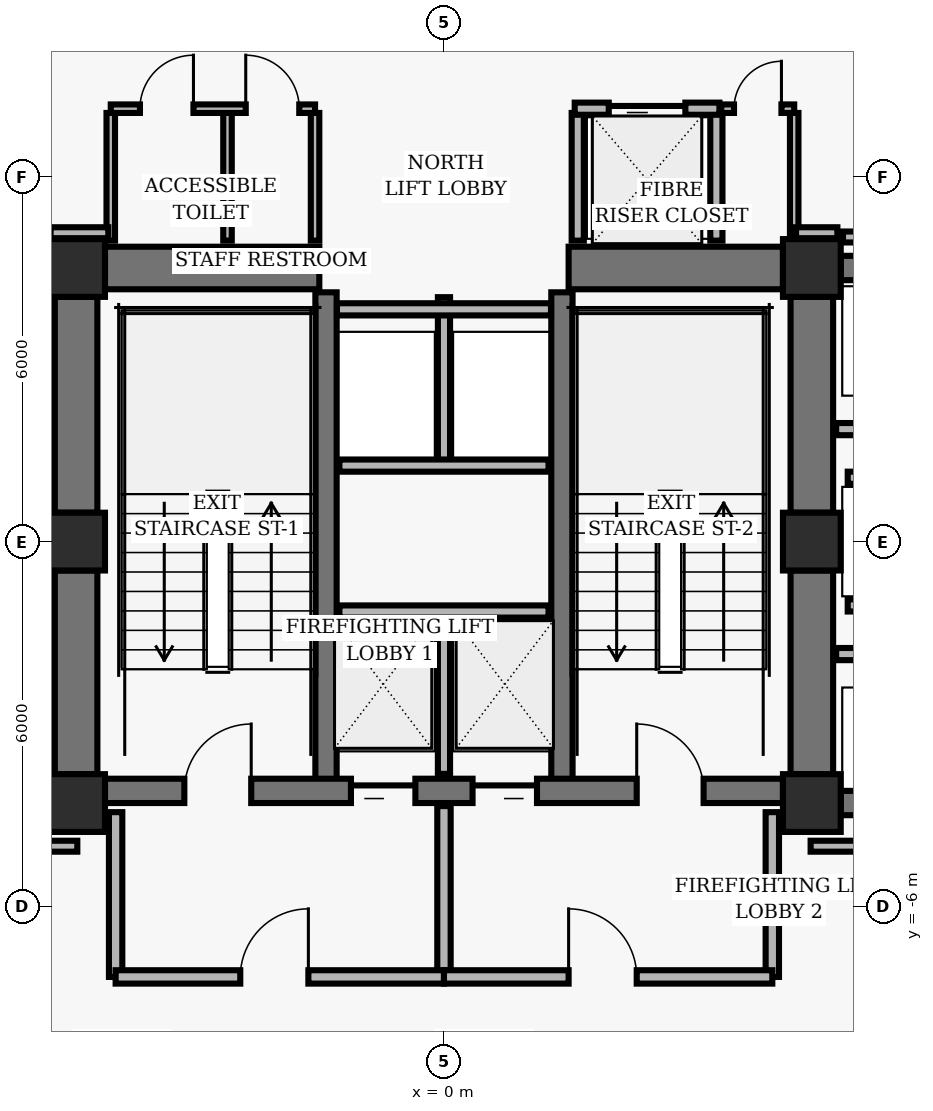
"""IFC4 building model, lengths in metres.
Left out: names, types, materials, properties, quantities, classifications, styles, units other than length and angle.
Written with IfcOpenShell. Run it as: python <this file> out.ifc"""

import sys

from ifc_helpers import new_model, si_unit, direction, frame, frame_2d, origin, origin_2d, place, context, subcontext, project, spatial, rectangle, hollow_rectangle, extrude, element, fill, save


model = new_model("IFC4")
c1 = context("Model", 3, precision=1e-05, world=origin(), true_north=direction((0.0, 1.0)))
c2 = subcontext(c1, "Body", "Model", "MODEL_VIEW")
j1 = project(units=[si_unit("LENGTHUNIT", "METRE"), si_unit("PLANEANGLEUNIT", "RADIAN")], contexts=[c1])
p1 = place(None, origin())
s1 = spatial("IfcSite", under=j1, at=p1, CompositionType="ELEMENT")
p2 = place(p1, origin())
s2 = spatial("IfcBuilding", under=s1, at=p2, CompositionType="ELEMENT")
p3 = place(p2, frame((0.0, 0.0, 35.68)))
s3 = spatial("IfcBuildingStorey", under=s2, at=p3, CompositionType="ELEMENT", Elevation=35.68)
for number, where, z_axis, x_axis in (
    (1, (-6.05, 4.5, 0.0), (0.0, 0.0, 1.0), (1.0, 0.0, 0.0)),
    (2, (6.05, 4.5, 0.0), (0.0, 0.0, 1.0), (1.0, 0.0, 0.0)),
    (3, (-6.05, 0.0, 0.0), (0.0, 0.0, 1.0), (1.0, 0.0, 0.0)),
    (4, (6.05, 0.0, 0.0), (0.0, 0.0, 1.0), (1.0, 0.0, 0.0)),
    (5, (-6.05, -4.3, 0.0), (0.0, 0.0, 1.0), (1.0, 0.0, 0.0)),
    (6, (6.05, -4.3, 0.0), (0.0, 0.0, 1.0), (1.0, 0.0, 0.0)),
):
    element("IfcColumn", number, at=place(p3, frame(where, z_axis=z_axis, x_axis=x_axis)), inside=s3, PredefinedType="COLUMN", context=c2, shape_type="SweptSolid", body=[
        extrude(hollow_rectangle(XDim=0.95, YDim=0.95, WallThickness=0.06, InnerFilletRadius=0.02, OuterFilletRadius=0.04, at=origin_2d()), origin(), (0.0, 0.0, 1.0), 3.36),
    ])
p4 = place(p3, frame((-6.05, 0.475, 0.0), z_axis=(0.0, 0.0, 1.0), x_axis=(0.0, 1.0, 0.0)))
e7 = element("IfcWall", 7, at=p4, inside=s3, PredefinedType="SHEAR", context=c2, shape_type="SweptSolid", body=[
    extrude(rectangle(XDim=3.55, YDim=0.7, at=frame_2d((1.775, 0.0))), origin(), (0.0, 0.0, 1.0), 3.098),
])
p5 = place(p3, frame((-6.05, -3.825, 0.0), z_axis=(0.0, 0.0, 1.0), x_axis=(0.0, 1.0, 0.0)))
e8 = element("IfcWall", 8, at=p5, inside=s3, PredefinedType="SHEAR", context=c2, shape_type="SweptSolid", body=[
    extrude(rectangle(XDim=3.35, YDim=0.7, at=frame_2d((1.675, 0.0))), origin(), (0.0, 0.0, 1.0), 3.098),
])
p6 = place(p3, frame((6.05, 0.475, 0.0), z_axis=(0.0, 0.0, 1.0), x_axis=(0.0, 1.0, 0.0)))
e9 = element("IfcWall", 9, at=p6, inside=s3, PredefinedType="SHEAR", context=c2, shape_type="SweptSolid", body=[
    extrude(rectangle(XDim=3.55, YDim=0.7, at=frame_2d((1.775, 0.0))), origin(), (0.0, 0.0, 1.0), 3.098),
])
p7 = place(p3, frame((6.05, -3.825, 0.0), z_axis=(0.0, 0.0, 1.0), x_axis=(0.0, 1.0, 0.0)))
e10 = element("IfcWall", 10, at=p7, inside=s3, PredefinedType="SHEAR", context=c2, shape_type="SweptSolid", body=[
    extrude(rectangle(XDim=3.35, YDim=0.7, at=frame_2d((1.675, 0.0))), origin(), (0.0, 0.0, 1.0), 3.098),
])
for number, where, z_axis, x_axis in (
    (11, (-1.94, -4.1, 0.0), (0.0, 0.0, 1.0), (0.0, 1.0, 0.0)),
    (12, (1.94, -4.1, 0.0), (0.0, 0.0, 1.0), (0.0, 1.0, 0.0)),
):
    element("IfcWall", number, at=place(p3, frame(where, z_axis=z_axis, x_axis=x_axis)), inside=s3, PredefinedType="SHEAR", context=c2, shape_type="SweptSolid", body=[
        extrude(rectangle(XDim=8.2, YDim=0.35, at=frame_2d((4.1, 0.0))), origin(), (0.0, 0.0, 1.0), 3.098),
    ])
p8 = place(p3, frame((-5.575, -4.1, 0.0), z_axis=(0.0, 0.0, 1.0), x_axis=(1.0, 0.0, 0.0)))
e13 = element("IfcWall", 13, at=p8, inside=s3, PredefinedType="SHEAR", context=c2, shape_type="SweptSolid", body=[
    extrude(rectangle(XDim=11.15, YDim=0.4, at=frame_2d((5.575, 0.0))), origin(), (0.0, 0.0, 1.0), 3.098),
])
p9 = place(p8, frame((1.305, 0.0, 0.0)))
e14 = element("IfcOpeningElement", 14, at=p9, cuts=e13, PredefinedType="OPENING", context=c2, shape_type="SweptSolid", body=[
    extrude(rectangle(XDim=1.1, YDim=2.04, at=frame_2d((0.55, 1.02))), frame((0.0, 0.21, 0.0), z_axis=(0.0, -1.0, 0.0), x_axis=(1.0, 0.0, 0.0)), (0.0, 0.0, 1.0), 0.42),
])
p10 = place(p8, frame((8.745, 0.0, 0.0)))
e15 = element("IfcOpeningElement", 15, at=p10, cuts=e13, PredefinedType="OPENING", context=c2, shape_type="SweptSolid", body=[
    extrude(rectangle(XDim=1.1, YDim=2.04, at=frame_2d((0.55, 1.02))), frame((0.0, 0.21, 0.0), z_axis=(0.0, -1.0, 0.0), x_axis=(1.0, 0.0, 0.0)), (0.0, 0.0, 1.0), 0.42),
])
p11 = place(p8, frame((4.045, 0.0, 0.0)))
e16 = element("IfcOpeningElement", 16, at=p11, cuts=e13, PredefinedType="OPENING", context=c2, shape_type="SweptSolid", body=[
    extrude(rectangle(XDim=1.06, YDim=2.04, at=frame_2d((0.53, 1.02))), frame((0.0, 0.21, 0.0), z_axis=(0.0, -1.0, 0.0), x_axis=(1.0, 0.0, 0.0)), (0.0, 0.0, 1.0), 0.42),
])
p12 = place(p8, frame((6.045, 0.0, 0.0)))
e17 = element("IfcOpeningElement", 17, at=p12, cuts=e13, PredefinedType="OPENING", context=c2, shape_type="SweptSolid", body=[
    extrude(rectangle(XDim=1.06, YDim=2.04, at=frame_2d((0.53, 1.02))), frame((0.0, 0.21, 0.0), z_axis=(0.0, -1.0, 0.0), x_axis=(1.0, 0.0, 0.0)), (0.0, 0.0, 1.0), 0.42),
])
for number, where, z_axis, x_axis in (
    (18, (-5.575, 4.5, 0.0), (0.0, 0.0, 1.0), (1.0, 0.0, 0.0)),
    (19, (2.05, 4.5, 0.0), (0.0, 0.0, 1.0), (1.0, 0.0, 0.0)),
):
    element("IfcWall", number, at=place(p3, frame(where, z_axis=z_axis, x_axis=x_axis)), inside=s3, PredefinedType="SHEAR", context=c2, shape_type="SweptSolid", body=[
        extrude(rectangle(XDim=3.525, YDim=0.7, at=frame_2d((1.762, 0.0))), origin(), (0.0, 0.0, 1.0), 3.098),
    ])
for number, where, z_axis, x_axis in (
    (20, (6.525, 4.5, 0.0), (0.0, 0.0, 1.0), (1.0, 0.0, 0.0)),
    (21, (6.525, -4.3, 0.0), (0.0, 0.0, 1.0), (1.0, 0.0, 0.0)),
):
    element("IfcWall", number, at=place(p3, frame(where, z_axis=z_axis, x_axis=x_axis)), inside=s3, PredefinedType="SHEAR", context=c2, shape_type="SweptSolid", body=[
        extrude(rectangle(XDim=1.95, YDim=0.4, at=frame_2d((0.975, 0.0))), origin(), (0.0, 0.0, 1.0), 3.098),
    ])
p13 = place(p3, frame((0.0, -3.82, 0.0), z_axis=(0.0, 0.0, 1.0), x_axis=(0.0, 1.0, 0.0)))
e22 = element("IfcWall", 22, at=p13, inside=s3, PredefinedType="PARTITIONING", context=c2, shape_type="SweptSolid", body=[
    extrude(rectangle(XDim=2.67, YDim=0.2, at=frame_2d((1.335, 0.0))), origin(), (0.0, 0.0, 1.0), 3.073),
])
p14 = place(p3, frame((-1.72, -1.15, 0.0), z_axis=(0.0, 0.0, 1.0), x_axis=(1.0, 0.0, 0.0)))
e23 = element("IfcWall", 23, at=p14, inside=s3, PredefinedType="PARTITIONING", context=c2, shape_type="SweptSolid", body=[
    extrude(rectangle(XDim=3.44, YDim=0.2, at=frame_2d((1.72, 0.0))), origin(), (0.0, 0.0, 1.0), 3.073),
])
for number, where, z_axis, x_axis in (
    (24, (-5.4, -7.16, 0.0), (0.0, 0.0, 1.0), (0.0, 1.0, 0.0)),
    (25, (5.4, -7.16, 0.0), (0.0, 0.0, 1.0), (0.0, 1.0, 0.0)),
):
    element("IfcWall", number, at=place(p3, frame(where, z_axis=z_axis, x_axis=x_axis)), inside=s3, PredefinedType="PARTITIONING", context=c2, shape_type="SweptSolid", body=[
        extrude(rectangle(XDim=2.71, YDim=0.22, at=frame_2d((1.355, 0.0))), origin(), (0.0, 0.0, 1.0), 3.073),
    ])
p15 = place(p3, frame((0.0, -7.16, 0.0), z_axis=(0.0, 0.0, 1.0), x_axis=(0.0, 1.0, 0.0)))
e26 = element("IfcWall", 26, at=p15, inside=s3, PredefinedType="PARTITIONING", context=c2, shape_type="SweptSolid", body=[
    extrude(rectangle(XDim=2.81, YDim=0.22, at=frame_2d((1.405, 0.0))), origin(), (0.0, 0.0, 1.0), 3.073),
])
p16 = place(p3, frame((-5.4, -7.16, 0.0), z_axis=(0.0, 0.0, 1.0), x_axis=(1.0, 0.0, 0.0)))
e27 = element("IfcWall", 27, at=p16, inside=s3, PredefinedType="PARTITIONING", context=c2, shape_type="SweptSolid", body=[
    extrude(rectangle(XDim=5.4, YDim=0.22, at=frame_2d((2.7, 0.0))), origin(), (0.0, 0.0, 1.0), 3.073),
])
p17 = place(p16, frame((2.05, 0.0, 0.0)))
e28 = element("IfcOpeningElement", 28, at=p17, cuts=e27, PredefinedType="OPENING", context=c2, shape_type="SweptSolid", body=[
    extrude(rectangle(XDim=1.12, YDim=2.02, at=frame_2d((0.56, 1.01))), frame((0.0, 0.12, 0.0), z_axis=(0.0, -1.0, 0.0), x_axis=(1.0, 0.0, 0.0)), (0.0, 0.0, 1.0), 0.24),
])
p18 = place(p3, frame((0.0, -7.16, 0.0), z_axis=(0.0, 0.0, 1.0), x_axis=(1.0, 0.0, 0.0)))
e29 = element("IfcWall", 29, at=p18, inside=s3, PredefinedType="PARTITIONING", context=c2, shape_type="SweptSolid", body=[
    extrude(rectangle(XDim=5.4, YDim=0.22, at=frame_2d((2.7, 0.0))), origin(), (0.0, 0.0, 1.0), 3.073),
])
p19 = place(p18, frame((2.05, 0.0, 0.0)))
e30 = element("IfcOpeningElement", 30, at=p19, cuts=e29, PredefinedType="OPENING", context=c2, shape_type="SweptSolid", body=[
    extrude(rectangle(XDim=1.12, YDim=2.02, at=frame_2d((0.56, 1.01))), frame((0.0, 0.12, 0.0), z_axis=(0.0, -1.0, 0.0), x_axis=(1.0, 0.0, 0.0)), (0.0, 0.0, 1.0), 0.24),
])
p20 = place(p3, frame((0.0, 1.25, 0.0), z_axis=(0.0, 0.0, 1.0), x_axis=(0.0, 1.0, 0.0)))
e31 = element("IfcWall", 31, at=p20, inside=s3, PredefinedType="PARTITIONING", context=c2, shape_type="SweptSolid", body=[
    extrude(rectangle(XDim=2.77, YDim=0.2, at=frame_2d((1.385, 0.0))), origin(), (0.0, 0.0, 1.0), 3.073),
])
p21 = place(p3, frame((-1.72, 1.25, 0.0), z_axis=(0.0, 0.0, 1.0), x_axis=(1.0, 0.0, 0.0)))
e32 = element("IfcWall", 32, at=p21, inside=s3, PredefinedType="PARTITIONING", context=c2, shape_type="SweptSolid", body=[
    extrude(rectangle(XDim=3.44, YDim=0.2, at=frame_2d((1.72, 0.0))), origin(), (0.0, 0.0, 1.0), 3.073),
])
p22 = place(p3, frame((-1.76, 3.82, 0.0), z_axis=(0.0, 0.0, 1.0), x_axis=(1.0, 0.0, 0.0)))
e33 = element("IfcWall", 33, at=p22, inside=s3, PredefinedType="PARTITIONING", context=c2, shape_type="SweptSolid", body=[
    extrude(rectangle(XDim=3.52, YDim=0.2, at=frame_2d((1.76, 0.0))), origin(), (0.0, 0.0, 1.0), 3.073),
])
for number, where, z_axis, x_axis in (
    (34, (2.2, 4.95, 0.0), (0.0, 0.0, 1.0), (0.0, 1.0, 0.0)),
    (35, (4.48, 4.95, 0.0), (0.0, 0.0, 1.0), (0.0, 1.0, 0.0)),
):
    element("IfcWall", number, at=place(p3, frame(where, z_axis=z_axis, x_axis=x_axis)), inside=s3, PredefinedType="PARTITIONING", context=c2, shape_type="SweptSolid", body=[
        extrude(rectangle(XDim=2.1, YDim=0.2, at=frame_2d((1.05, 0.0))), origin(), (0.0, 0.0, 1.0), 3.073),
    ])
p23 = place(p3, frame((2.15, 7.12, 0.0), z_axis=(0.0, 0.0, 1.0), x_axis=(1.0, 0.0, 0.0)))
e36 = element("IfcWall", 36, at=p23, inside=s3, PredefinedType="PARTITIONING", context=c2, shape_type="SweptSolid", body=[
    extrude(rectangle(XDim=2.38, YDim=0.2, at=frame_2d((1.19, 0.0))), origin(), (0.0, 0.0, 1.0), 3.073),
])
p24 = place(p23, frame((0.56, 0.0, 0.0)))
e37 = element("IfcOpeningElement", 37, at=p24, cuts=e36, PredefinedType="OPENING", context=c2, shape_type="SweptSolid", body=[
    extrude(rectangle(XDim=1.26, YDim=2.06, at=frame_2d((0.63, 1.03))), frame((0.0, 0.11, 0.0), z_axis=(0.0, -1.0, 0.0), x_axis=(1.0, 0.0, 0.0)), (0.0, 0.0, 1.0), 0.22),
])
for number, where, z_axis, x_axis in (
    (38, (-5.48, 4.95, 0.0), (0.0, 0.0, 1.0), (0.0, 1.0, 0.0)),
    (39, (-3.56, 4.95, 0.0), (0.0, 0.0, 1.0), (0.0, 1.0, 0.0)),
    (40, (-2.12, 4.95, 0.0), (0.0, 0.0, 1.0), (0.0, 1.0, 0.0)),
):
    element("IfcWall", number, at=place(p3, frame(where, z_axis=z_axis, x_axis=x_axis)), inside=s3, PredefinedType="PARTITIONING", context=c2, shape_type="SweptSolid", body=[
        extrude(rectangle(XDim=2.1, YDim=0.14, at=frame_2d((1.05, 0.0))), origin(), (0.0, 0.0, 1.0), 3.073),
    ])
p25 = place(p3, frame((-5.48, 7.12, 0.0), z_axis=(0.0, 0.0, 1.0), x_axis=(1.0, 0.0, 0.0)))
e41 = element("IfcWall", 41, at=p25, inside=s3, PredefinedType="PARTITIONING", context=c2, shape_type="SweptSolid", body=[
    extrude(rectangle(XDim=3.36, YDim=0.14, at=frame_2d((1.68, 0.0))), origin(), (0.0, 0.0, 1.0), 3.073),
])
p26 = place(p25, frame((0.48, 0.0, 0.0)))
e42 = element("IfcOpeningElement", 42, at=p26, cuts=e41, PredefinedType="OPENING", context=c2, shape_type="SweptSolid", body=[
    extrude(rectangle(XDim=0.88, YDim=2.02, at=frame_2d((0.44, 1.01))), frame((0.0, 0.08, 0.0), z_axis=(0.0, -1.0, 0.0), x_axis=(1.0, 0.0, 0.0)), (0.0, 0.0, 1.0), 0.16),
])
p27 = place(p25, frame((2.22, 0.0, 0.0)))
e43 = element("IfcOpeningElement", 43, at=p27, cuts=e41, PredefinedType="OPENING", context=c2, shape_type="SweptSolid", body=[
    extrude(rectangle(XDim=0.88, YDim=2.02, at=frame_2d((0.44, 1.01))), frame((0.0, 0.08, 0.0), z_axis=(0.0, -1.0, 0.0), x_axis=(1.0, 0.0, 0.0)), (0.0, 0.0, 1.0), 0.16),
])
p28 = place(p3, frame((5.76, 4.95, 0.0), z_axis=(0.0, 0.0, 1.0), x_axis=(0.0, 1.0, 0.0)))
e44 = element("IfcWall", 44, at=p28, inside=s3, PredefinedType="PARTITIONING", context=c2, shape_type="SweptSolid", body=[
    extrude(rectangle(XDim=2.1, YDim=0.14, at=frame_2d((1.05, 0.0))), origin(), (0.0, 0.0, 1.0), 3.073),
])
p29 = place(p3, frame((4.56, 7.12, 0.0), z_axis=(0.0, 0.0, 1.0), x_axis=(1.0, 0.0, 0.0)))
e45 = element("IfcWall", 45, at=p29, inside=s3, PredefinedType="PARTITIONING", context=c2, shape_type="SweptSolid", body=[
    extrude(rectangle(XDim=1.2, YDim=0.14, at=frame_2d((0.6, 0.0))), origin(), (0.0, 0.0, 1.0), 3.073),
])
p30 = place(p29, frame((0.21, 0.0, 0.0)))
e46 = element("IfcOpeningElement", 46, at=p30, cuts=e45, PredefinedType="OPENING", context=c2, shape_type="SweptSolid", body=[
    extrude(rectangle(XDim=0.78, YDim=2.01, at=frame_2d((0.39, 1.005))), frame((0.0, 0.08, 0.0), z_axis=(0.0, -1.0, 0.0), x_axis=(1.0, 0.0, 0.0)), (0.0, 0.0, 1.0), 0.16),
])
for number, where, z_axis, x_axis in (
    (47, (6.45, -1.85, 0.0), (0.0, 0.0, 1.0), (1.0, 0.0, 0.0)),
    (48, (6.45, 1.85, 0.0), (0.0, 0.0, 1.0), (1.0, 0.0, 0.0)),
):
    element("IfcWall", number, at=place(p3, frame(where, z_axis=z_axis, x_axis=x_axis)), inside=s3, PredefinedType="PARTITIONING", context=c2, shape_type="SweptSolid", body=[
        extrude(rectangle(XDim=2.1, YDim=0.2, at=frame_2d((1.05, 0.0))), origin(), (0.0, 0.0, 1.0), 3.073),
    ])
for number, where, z_axis, x_axis in (
    (49, (6.64, -1.05, 0.0), (0.0, 0.0, 1.0), (1.0, 0.0, 0.0)),
    (50, (6.64, 1.05, 0.0), (0.0, 0.0, 1.0), (1.0, 0.0, 0.0)),
):
    element("IfcWall", number, at=place(p3, frame(where, z_axis=z_axis, x_axis=x_axis)), inside=s3, PredefinedType="PARTITIONING", context=c2, shape_type="SweptSolid", body=[
        extrude(rectangle(XDim=1.91, YDim=0.2, at=frame_2d((0.955, 0.0))), origin(), (0.0, 0.0, 1.0), 3.073),
    ])
for number, where, z_axis, x_axis in (
    (51, (-9.37, -5.01, 0.0), (0.0, 0.0, 1.0), (1.0, 0.0, 0.0)),
    (52, (6.03, -5.01, 0.0), (0.0, 0.0, 1.0), (1.0, 0.0, 0.0)),
):
    element("IfcWall", number, at=place(p3, frame(where, z_axis=z_axis, x_axis=x_axis)), inside=s3, PredefinedType="PARTITIONING", context=c2, shape_type="SweptSolid", body=[
        extrude(rectangle(XDim=3.34, YDim=0.18, at=frame_2d((1.67, 0.0))), origin(), (0.0, 0.0, 1.0), 3.073),
    ])
p31 = place(p3, frame((9.37, 5.01, 0.0), z_axis=(0.0, 0.0, 1.0), x_axis=(-1.0, 0.0, 0.0)))
e53 = element("IfcWall", 53, at=p31, inside=s3, PredefinedType="PARTITIONING", context=c2, shape_type="SweptSolid", body=[
    extrude(rectangle(XDim=2.808, YDim=0.18, at=frame_2d((1.404, 0.0))), origin(), (0.0, 0.0, 1.0), 3.073),
])
p32 = place(p3, frame((6.47, 5.08, 0.0), z_axis=(0.0, 0.0, 1.0), x_axis=(-1.0, 0.0, 0.0)))
e54 = element("IfcWall", 54, at=p32, inside=s3, PredefinedType="PARTITIONING", context=c2, shape_type="SweptSolid", body=[
    extrude(rectangle(XDim=0.68, YDim=0.18, at=frame_2d((0.34, 0.0))), origin(), (0.0, 0.0, 1.0), 3.073),
])
p33 = place(p3, frame((-5.52, 5.08, 0.0), z_axis=(0.0, 0.0, 1.0), x_axis=(-1.0, 0.0, 0.0)))
e55 = element("IfcWall", 55, at=p33, inside=s3, PredefinedType="PARTITIONING", context=c2, shape_type="SweptSolid", body=[
    extrude(rectangle(XDim=0.95, YDim=0.18, at=frame_2d((0.475, 0.0))), origin(), (0.0, 0.0, 1.0), 3.073),
])
p34 = place(p9, origin())
e56 = element("IfcDoor", 56, at=p34, inside=s3, OperationType="SINGLE_SWING_RIGHT", PredefinedType="DOOR", context=c2, shape_type="SweptSolid", body=[
    extrude(rectangle(XDim=1.1, YDim=2.04, at=frame_2d((0.55, 1.02))), frame((0.0, 0.025, 0.0), z_axis=(0.0, -1.0, 0.0), x_axis=(1.0, 0.0, 0.0)), (0.0, 0.0, 1.0), 0.05),
])
fill(e14, e56)
p35 = place(p10, origin())
e57 = element("IfcDoor", 57, at=p35, inside=s3, OperationType="SINGLE_SWING_LEFT", PredefinedType="DOOR", context=c2, shape_type="SweptSolid", body=[
    extrude(rectangle(XDim=1.1, YDim=2.04, at=frame_2d((0.55, 1.02))), frame((0.0, 0.025, 0.0), z_axis=(0.0, -1.0, 0.0), x_axis=(1.0, 0.0, 0.0)), (0.0, 0.0, 1.0), 0.05),
])
fill(e15, e57)
p36 = place(p11, origin())
e58 = element("IfcDoor", 58, at=p36, inside=s3, OperationType="SLIDING_TO_LEFT", PredefinedType="DOOR", context=c2, shape_type="SweptSolid", body=[
    extrude(rectangle(XDim=1.06, YDim=2.04, at=frame_2d((0.53, 1.02))), frame((0.0, 0.025, 0.0), z_axis=(0.0, -1.0, 0.0), x_axis=(1.0, 0.0, 0.0)), (0.0, 0.0, 1.0), 0.05),
])
fill(e16, e58)
p37 = place(p12, origin())
e59 = element("IfcDoor", 59, at=p37, inside=s3, OperationType="SLIDING_TO_RIGHT", PredefinedType="DOOR", context=c2, shape_type="SweptSolid", body=[
    extrude(rectangle(XDim=1.06, YDim=2.04, at=frame_2d((0.53, 1.02))), frame((0.0, 0.025, 0.0), z_axis=(0.0, -1.0, 0.0), x_axis=(1.0, 0.0, 0.0)), (0.0, 0.0, 1.0), 0.05),
])
fill(e17, e59)
p38 = place(p17, origin())
e60 = element("IfcDoor", 60, at=p38, inside=s3, OperationType="SINGLE_SWING_RIGHT", PredefinedType="DOOR", context=c2, shape_type="SweptSolid", body=[
    extrude(rectangle(XDim=1.12, YDim=2.02, at=frame_2d((0.56, 1.01))), frame((0.0, 0.025, 0.0), z_axis=(0.0, -1.0, 0.0), x_axis=(1.0, 0.0, 0.0)), (0.0, 0.0, 1.0), 0.05),
])
fill(e28, e60)
p39 = place(p19, origin())
e61 = element("IfcDoor", 61, at=p39, inside=s3, OperationType="SINGLE_SWING_LEFT", PredefinedType="DOOR", context=c2, shape_type="SweptSolid", body=[
    extrude(rectangle(XDim=1.12, YDim=2.02, at=frame_2d((0.56, 1.01))), frame((0.0, 0.025, 0.0), z_axis=(0.0, -1.0, 0.0), x_axis=(1.0, 0.0, 0.0)), (0.0, 0.0, 1.0), 0.05),
])
fill(e30, e61)
p40 = place(p24, origin())
e62 = element("IfcDoor", 62, at=p40, inside=s3, OperationType="SLIDING_TO_LEFT", PredefinedType="DOOR", context=c2, shape_type="SweptSolid", body=[
    extrude(rectangle(XDim=1.26, YDim=2.06, at=frame_2d((0.63, 1.03))), frame((0.0, 0.025, 0.0), z_axis=(0.0, -1.0, 0.0), x_axis=(1.0, 0.0, 0.0)), (0.0, 0.0, 1.0), 0.05),
])
fill(e37, e62)
p41 = place(p26, origin())
e63 = element("IfcDoor", 63, at=p41, inside=s3, OperationType="SINGLE_SWING_RIGHT", PredefinedType="DOOR", context=c2, shape_type="SweptSolid", body=[
    extrude(rectangle(XDim=0.88, YDim=2.02, at=frame_2d((0.44, 1.01))), frame((0.0, 0.025, 0.0), z_axis=(0.0, -1.0, 0.0), x_axis=(1.0, 0.0, 0.0)), (0.0, 0.0, 1.0), 0.05),
])
fill(e42, e63)
p42 = place(p27, origin())
e64 = element("IfcDoor", 64, at=p42, inside=s3, OperationType="SINGLE_SWING_LEFT", PredefinedType="DOOR", context=c2, shape_type="SweptSolid", body=[
    extrude(rectangle(XDim=0.88, YDim=2.02, at=frame_2d((0.44, 1.01))), frame((0.0, 0.025, 0.0), z_axis=(0.0, -1.0, 0.0), x_axis=(1.0, 0.0, 0.0)), (0.0, 0.0, 1.0), 0.05),
])
fill(e43, e64)
p43 = place(p30, origin())
e65 = element("IfcDoor", 65, at=p43, inside=s3, OperationType="SINGLE_SWING_RIGHT", PredefinedType="DOOR", context=c2, shape_type="SweptSolid", body=[
    extrude(rectangle(XDim=0.78, YDim=2.01, at=frame_2d((0.39, 1.005))), frame((0.0, 0.025, 0.0), z_axis=(0.0, -1.0, 0.0), x_axis=(1.0, 0.0, 0.0)), (0.0, 0.0, 1.0), 0.05),
])
fill(e46, e65)
save(model, sys.argv[1])
